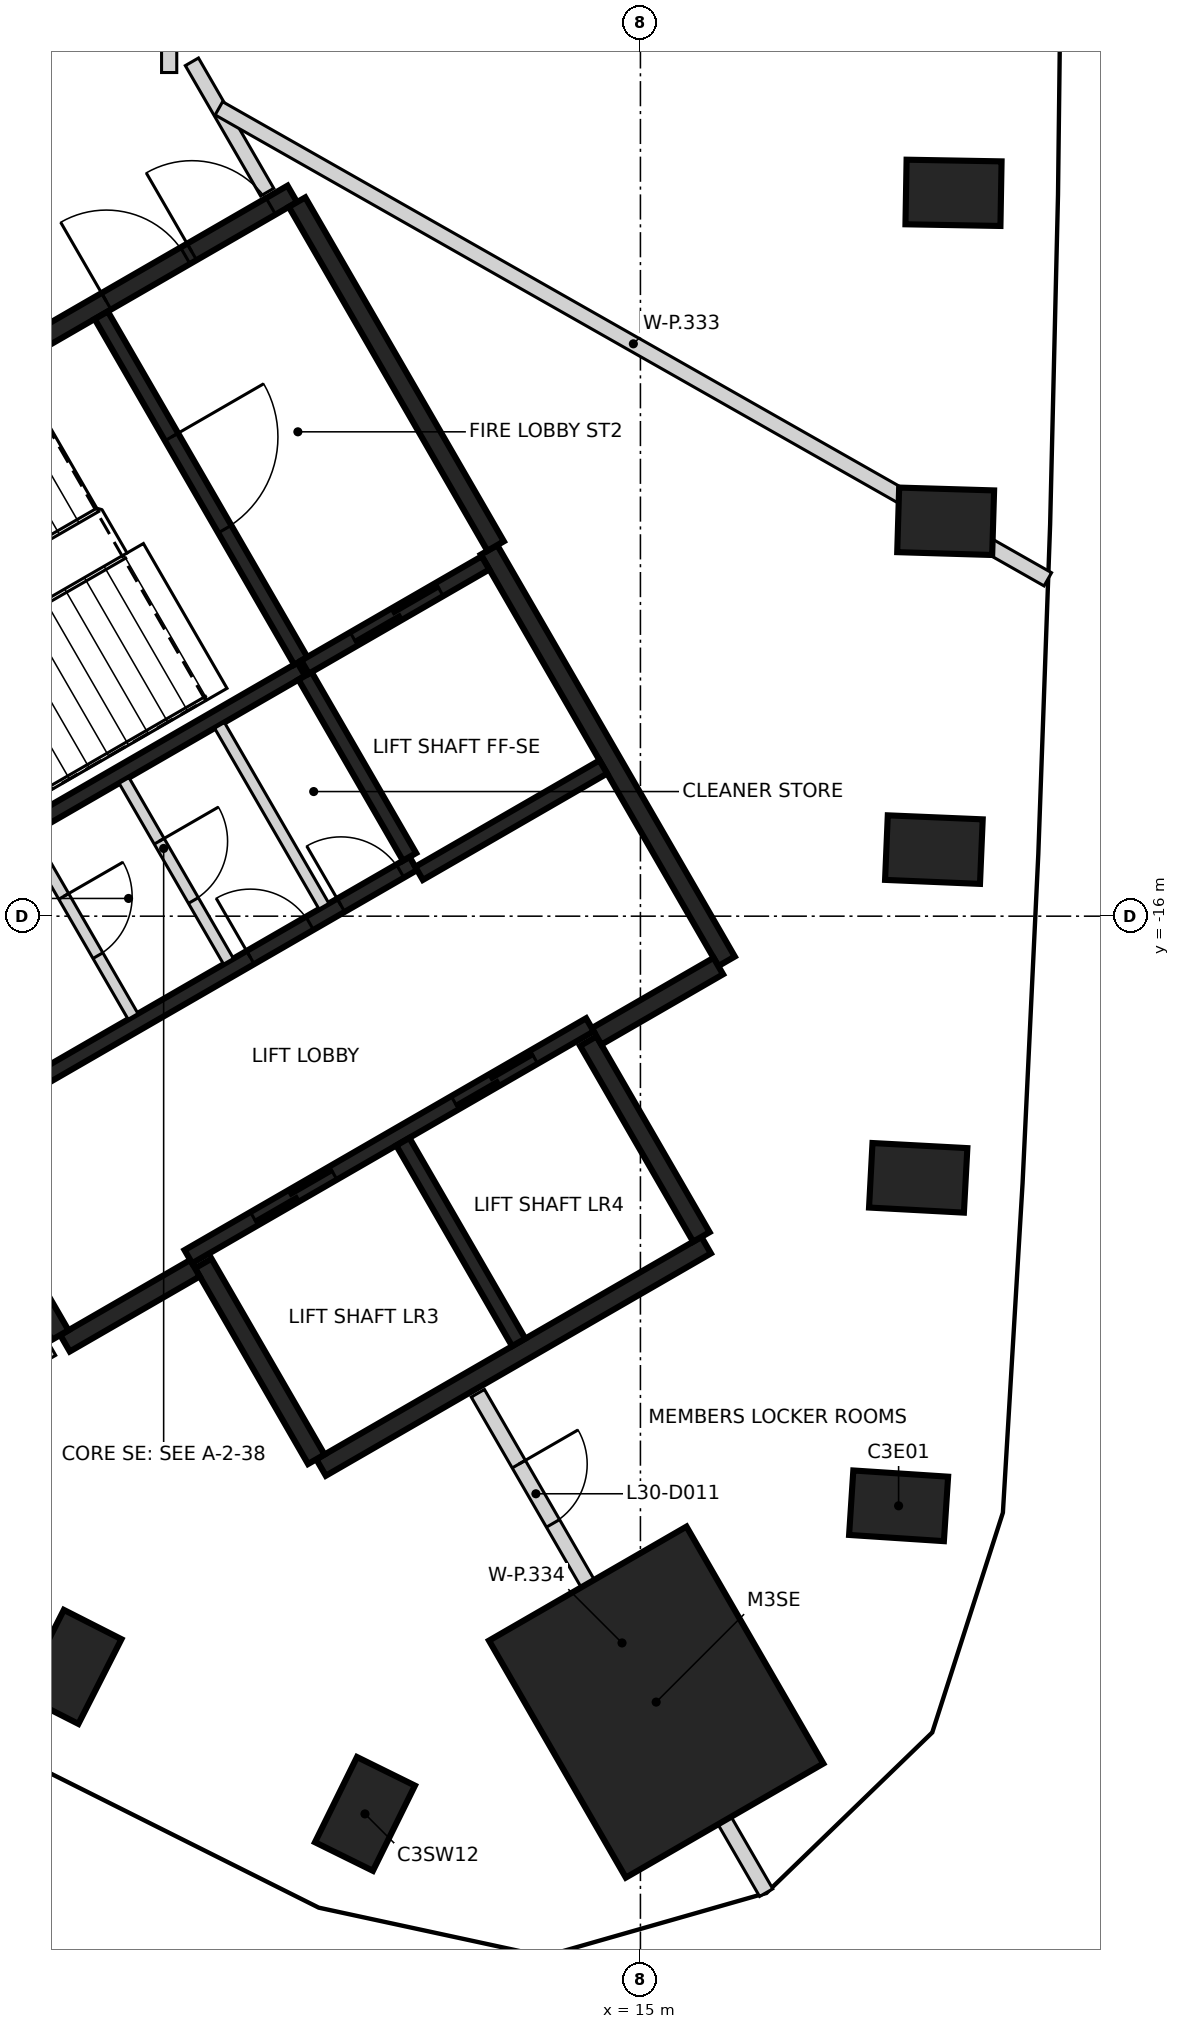
"""IFC4 building model, lengths in metres.
Left out: names, types, materials, properties, quantities, classifications, styles, units other than length and angle.
Written with IfcOpenShell. Run it as: python <this file> out.ifc"""

import sys

from ifc_helpers import new_model, si_unit, direction, frame, frame_2d, origin, origin_2d, place, context, subcontext, project, spatial, rectangle, extrude, element, fill, save


model = new_model("IFC4")
c1 = context("Model", 3, precision=1e-05, world=origin(), true_north=direction((0.0, 1.0)))
c2 = subcontext(c1, "Body", "Model", "MODEL_VIEW")
j1 = project(units=[si_unit("LENGTHUNIT", "METRE"), si_unit("PLANEANGLEUNIT", "RADIAN")], contexts=[c1])
p1 = place(None, origin())
s1 = spatial("IfcSite", under=j1, at=p1, CompositionType="ELEMENT")
p2 = place(p1, origin())
s2 = spatial("IfcBuilding", under=s1, at=p2, CompositionType="ELEMENT")
p3 = place(p2, frame((0.0, 0.0, 123.8)))
s3 = spatial("IfcBuildingStorey", under=s2, at=p3, CompositionType="ELEMENT", Elevation=123.8)
for number, where, z_axis, x_axis in (
    (1, (18.397, -23.757, -0.4), (0.0, 0.0, 1.0), (-0.998, 0.065, 0.0)),
    (2, (18.655, -19.442, -0.4), (0.0, 0.0, 1.0), (-0.999, 0.054, 0.0)),
    (3, (18.861, -15.124, -0.4), (0.0, 0.0, 1.0), (-0.999, 0.042, 0.0)),
    (4, (19.016, -10.805, -0.4), (0.0, 0.0, 1.0), (-1.0, 0.03, 0.0)),
    (5, (19.119, -6.484, -0.4), (0.0, 0.0, 1.0), (-1.0, 0.018, 0.0)),
    (6, (7.51, -25.876, -0.4), (0.0, 0.0, 1.0), (0.453, 0.892, 0.0)),
    (7, (11.376, -27.811, -0.4), (0.0, 0.0, 1.0), (0.442, 0.897, 0.0)),
):
    element("IfcColumn", number, at=place(p3, frame(where, z_axis=z_axis, x_axis=x_axis)), inside=s3, PredefinedType="COLUMN", context=c2, shape_type="SweptSolid", body=[
        extrude(rectangle(XDim=1.25, YDim=0.85, at=origin_2d()), origin(), (0.0, 0.0, 1.0), 5.0),
    ])
p4 = place(p3, frame((15.207, -26.34, -0.4), z_axis=(0.0, 0.0, 1.0), x_axis=(-0.5, 0.866025403784, 0.0)))
e8 = element("IfcColumn", 8, at=p4, inside=s3, PredefinedType="COLUMN", context=c2, shape_type="SweptSolid", body=[
    extrude(rectangle(XDim=3.6, YDim=3.0, at=origin_2d()), origin(), (0.0, 0.0, 1.0), 5.0),
])
p5 = place(p3, frame((0.417, -12.273, 0.0), z_axis=(0.0, 0.0, 1.0), x_axis=(0.866021906294, 0.500006057782, 0.0)))
e9 = element("IfcWall", 9, at=p5, inside=s3, PredefinedType="SHEAR", context=c2, shape_type="SweptSolid", body=[
    extrude(rectangle(XDim=11.55, YDim=0.25, at=frame_2d((5.775, 0.0))), origin(), (0.0, 0.0, 1.0), 4.6),
])
p6 = place(p5, frame((10.025, 0.0, 0.0)))
e10 = element("IfcOpeningElement", 10, at=p6, cuts=e9, PredefinedType="OPENING", context=c2, shape_type="SweptSolid", body=[
    extrude(rectangle(XDim=1.2, YDim=2.1, at=frame_2d((0.6, 1.05))), frame((0.0, 0.135, 0.0), z_axis=(0.0, -1.0, 0.0), x_axis=(1.0, 0.0, 0.0)), (0.0, 0.0, 1.0), 0.27),
])
p7 = place(p5, frame((8.725, 0.0, 0.0)))
e11 = element("IfcOpeningElement", 11, at=p7, cuts=e9, PredefinedType="OPENING", context=c2, shape_type="SweptSolid", body=[
    extrude(rectangle(XDim=1.2, YDim=2.1, at=frame_2d((0.6, 1.05))), frame((0.0, 0.135, 0.0), z_axis=(0.0, -1.0, 0.0), x_axis=(1.0, 0.0, 0.0)), (0.0, 0.0, 1.0), 0.27),
])
p8 = place(p3, frame((13.008, -11.181, 0.0), z_axis=(0.0, 0.0, 1.0), x_axis=(0.500004234368, -0.866022959057, 0.0)))
e12 = element("IfcWall", 12, at=p8, inside=s3, PredefinedType="SHEAR", context=c2, shape_type="SweptSolid", body=[
    extrude(rectangle(XDim=6.25, YDim=0.25, at=frame_2d((3.125, 0.0))), origin(), (0.0, 0.0, 1.0), 4.6),
])
p9 = place(p3, frame((15.865, -20.328, 0.0), z_axis=(0.0, 0.0, 1.0), x_axis=(-0.86602852612, -0.499994591916, 0.0)))
e13 = element("IfcWall", 13, at=p9, inside=s3, PredefinedType="SHEAR", context=c2, shape_type="SweptSolid", body=[
    extrude(rectangle(XDim=5.85, YDim=0.25, at=frame_2d((2.925, 0.0))), origin(), (0.0, 0.0, 1.0), 4.6),
])
p10 = place(p3, frame((10.483, -6.606, 0.0), z_axis=(0.0, 0.0, 1.0), x_axis=(0.49999885962, -0.866026062182, 0.0)))
e14 = element("IfcWall", 14, at=p10, inside=s3, PredefinedType="SHEAR", context=c2, shape_type="SweptSolid", body=[
    extrude(rectangle(XDim=5.225, YDim=0.25, at=frame_2d((2.612, 0.0))), origin(), (0.0, 0.0, 1.0), 4.6),
])
for number, where, z_axis, x_axis in (
    (15, (14.315, -17.644, 0.0), (0.0, 0.0, 1.0), (0.5, -0.866, 0.0)),
    (16, (10.736, -23.145, 0.0), (0.0, 0.0, 1.0), (-0.5, 0.866, 0.0)),
):
    element("IfcWall", number, at=place(p3, frame(where, z_axis=z_axis, x_axis=x_axis)), inside=s3, PredefinedType="SHEAR", context=c2, shape_type="SweptSolid", body=[
        extrude(rectangle(XDim=2.974, YDim=0.25, at=frame_2d((1.487, 0.0))), origin(), (0.0, 0.0, 1.0), 4.6),
    ])
p11 = place(p3, frame((9.14, -20.631, 0.0), z_axis=(0.0, 0.0, 1.0), x_axis=(-0.866043531843, -0.499968599967, 0.0)))
e17 = element("IfcWall", 17, at=p11, inside=s3, PredefinedType="SHEAR", context=c2, shape_type="SweptSolid", body=[
    extrude(rectangle(XDim=1.975, YDim=0.25, at=frame_2d((0.987, 0.0))), origin(), (0.0, 0.0, 1.0), 4.6),
])
p12 = place(p3, frame((16.025, -16.656, 0.0), z_axis=(0.0, 0.0, 1.0), x_axis=(-0.866016279763, -0.500015802937, 0.0)))
e18 = element("IfcWall", 18, at=p12, inside=s3, PredefinedType="SHEAR", context=c2, shape_type="SweptSolid", body=[
    extrude(rectangle(XDim=1.849, YDim=0.25, at=frame_2d((0.925, 0.0))), origin(), (0.0, 0.0, 1.0), 4.6),
])
p13 = place(p3, frame((7.367, -21.51, 0.0), z_axis=(0.0, 0.0, 1.0), x_axis=(-0.499983108224, 0.866035156036, 0.0)))
e19 = element("IfcWall", 19, at=p13, inside=s3, PredefinedType="SHEAR", context=c2, shape_type="SweptSolid", body=[
    extrude(rectangle(XDim=1.865, YDim=0.25, at=frame_2d((0.932, 0.0))), origin(), (0.0, 0.0, 1.0), 4.6),
])
p14 = place(p13, frame((0.535, 0.0, 0.0)))
e20 = element("IfcOpeningElement", 20, at=p14, cuts=e19, PredefinedType="OPENING", context=c2, shape_type="SweptSolid", body=[
    extrude(rectangle(XDim=1.25, YDim=2.1, at=frame_2d((0.625, 1.05))), frame((0.0, 0.135, 0.0), z_axis=(0.0, -1.0, 0.0), x_axis=(1.0, 0.0, 0.0)), (0.0, 0.0, 1.0), 0.27),
])
p15 = place(p3, frame((9.052, -20.48, 0.0), z_axis=(0.0, 0.0, 1.0), x_axis=(0.866030299012, 0.499991521122, 0.0)))
e21 = element("IfcWall", 21, at=p15, inside=s3, PredefinedType="SHEAR", context=c2, shape_type="SweptSolid", body=[
    extrude(rectangle(XDim=6.1, YDim=0.2, at=frame_2d((3.05, 0.0))), origin(), (0.0, 0.0, 1.0), 4.6),
])
p16 = place(p15, frame((1.0, 0.0, 0.0)))
e22 = element("IfcOpeningElement", 22, at=p16, cuts=e21, PredefinedType="OPENING", context=c2, shape_type="SweptSolid", body=[
    extrude(rectangle(XDim=1.2, YDim=2.1, at=frame_2d((0.6, 1.05))), frame((0.0, 0.11, 0.0), z_axis=(0.0, -1.0, 0.0), x_axis=(1.0, 0.0, 0.0)), (0.0, 0.0, 1.0), 0.22),
])
p17 = place(p15, frame((4.05, 0.0, 0.0)))
e23 = element("IfcOpeningElement", 23, at=p17, cuts=e21, PredefinedType="OPENING", context=c2, shape_type="SweptSolid", body=[
    extrude(rectangle(XDim=1.2, YDim=2.1, at=frame_2d((0.6, 1.05))), frame((0.0, 0.11, 0.0), z_axis=(0.0, -1.0, 0.0), x_axis=(1.0, 0.0, 0.0)), (0.0, 0.0, 1.0), 0.22),
])
p18 = place(p3, frame((10.538, -12.752, 0.0), z_axis=(0.0, 0.0, 1.0), x_axis=(-0.866038630372, -0.499977090179, 0.0)))
e24 = element("IfcWall", 24, at=p18, inside=s3, PredefinedType="SHEAR", context=c2, shape_type="SweptSolid", body=[
    extrude(rectangle(XDim=5.699, YDim=0.2, at=frame_2d((2.85, 0.0))), origin(), (0.0, 0.0, 1.0), 4.6),
])
p19 = place(p3, frame((7.077, -18.156, 0.0), z_axis=(0.0, 0.0, 1.0), x_axis=(0.866038630372, 0.499977090179, 0.0)))
e25 = element("IfcWall", 25, at=p19, inside=s3, PredefinedType="SHEAR", context=c2, shape_type="SweptSolid", body=[
    extrude(rectangle(XDim=5.699, YDim=0.2, at=frame_2d((2.85, 0.0))), origin(), (0.0, 0.0, 1.0), 4.6),
])
p20 = place(p19, frame((3.224, 0.0, 0.0)))
e26 = element("IfcOpeningElement", 26, at=p20, cuts=e25, PredefinedType="OPENING", context=c2, shape_type="SweptSolid", body=[
    extrude(rectangle(XDim=0.9, YDim=2.1, at=frame_2d((0.45, 1.05))), frame((0.0, 0.11, 0.0), z_axis=(0.0, -1.0, 0.0), x_axis=(1.0, 0.0, 0.0)), (0.0, 0.0, 1.0), 0.22),
])
p21 = place(p19, frame((4.599, 0.0, 0.0)))
e27 = element("IfcOpeningElement", 27, at=p21, cuts=e25, PredefinedType="OPENING", context=c2, shape_type="SweptSolid", body=[
    extrude(rectangle(XDim=0.9, YDim=2.1, at=frame_2d((0.45, 1.05))), frame((0.0, 0.11, 0.0), z_axis=(0.0, -1.0, 0.0), x_axis=(1.0, 0.0, 0.0)), (0.0, 0.0, 1.0), 0.22),
])
p22 = place(p3, frame((7.906, -8.094, 0.0), z_axis=(0.0, 0.0, 1.0), x_axis=(0.500024287448, -0.866011380966, 0.0)))
e28 = element("IfcWall", 28, at=p22, inside=s3, PredefinedType="SHEAR", context=c2, shape_type="SweptSolid", body=[
    extrude(rectangle(XDim=5.251, YDim=0.2, at=frame_2d((2.625, 0.0))), origin(), (0.0, 0.0, 1.0), 4.6),
])
p23 = place(p22, frame((1.849, 0.0, 0.0)))
e29 = element("IfcOpeningElement", 29, at=p23, cuts=e28, PredefinedType="OPENING", context=c2, shape_type="SweptSolid", body=[
    extrude(rectangle(XDim=1.4, YDim=2.1, at=frame_2d((0.7, 1.05))), frame((0.0, 0.11, 0.0), z_axis=(0.0, -1.0, 0.0), x_axis=(1.0, 0.0, 0.0)), (0.0, 0.0, 1.0), 0.22),
])
p24 = place(p3, frame((11.875, -18.967, 0.0), z_axis=(0.0, 0.0, 1.0), x_axis=(0.49998131003, -0.866036194175, 0.0)))
e30 = element("IfcWall", 30, at=p24, inside=s3, PredefinedType="SHEAR", context=c2, shape_type="SweptSolid", body=[
    extrude(rectangle(XDim=3.048, YDim=0.2, at=frame_2d((1.524, 0.0))), origin(), (0.0, 0.0, 1.0), 4.6),
])
p25 = place(p3, frame((11.963, -15.22, 0.0), z_axis=(0.0, 0.0, 1.0), x_axis=(-0.500034990121, 0.866005201286, 0.0)))
e31 = element("IfcWall", 31, at=p25, inside=s3, PredefinedType="SHEAR", context=c2, shape_type="SweptSolid", body=[
    extrude(rectangle(XDim=2.75, YDim=0.2, at=frame_2d((1.375, 0.0))), origin(), (0.0, 0.0, 1.0), 4.6),
])
p26 = place(p3, frame((10.587, -12.723, 0.0), z_axis=(0.0, 0.0, 1.0), x_axis=(0.866037306777, 0.499979382845, 0.0)))
e32 = element("IfcWall", 32, at=p26, inside=s3, PredefinedType="SHEAR", context=c2, shape_type="SweptSolid", body=[
    extrude(rectangle(XDim=2.742, YDim=0.2, at=frame_2d((1.371, 0.0))), origin(), (0.0, 0.0, 1.0), 4.6),
])
p27 = place(p26, frame((0.743, 0.0, 0.0)))
e33 = element("IfcOpeningElement", 33, at=p27, cuts=e32, PredefinedType="OPENING", context=c2, shape_type="SweptSolid", body=[
    extrude(rectangle(XDim=1.3, YDim=2.1, at=frame_2d((0.65, 1.05))), frame((0.0, 0.11, 0.0), z_axis=(0.0, -1.0, 0.0), x_axis=(1.0, 0.0, 0.0)), (0.0, 0.0, 1.0), 0.22),
])
p28 = place(p3, frame((14.512, -14.037, 0.0), z_axis=(0.0, 0.0, 1.0), x_axis=(-0.866044696403, -0.499966582715, 0.0)))
e34 = element("IfcWall", 34, at=p28, inside=s3, PredefinedType="SHEAR", context=c2, shape_type="SweptSolid", body=[
    extrude(rectangle(XDim=2.799, YDim=0.2, at=frame_2d((1.399, 0.0))), origin(), (0.0, 0.0, 1.0), 4.6),
])
p29 = place(p3, frame((8.207, -14.214, 0.0), z_axis=(0.0, 0.0, 1.0), x_axis=(0.50002746344, -0.86600954718, 0.0)))
e35 = element("IfcWall", 35, at=p29, inside=s3, PredefinedType="PARTITIONING", context=c2, shape_type="SweptSolid", body=[
    extrude(rectangle(XDim=2.748, YDim=0.15, at=frame_2d((1.374, 0.0))), origin(), (0.0, 0.0, 1.0), 4.6),
])
p30 = place(p29, frame((0.924, 0.0, 0.0)))
e36 = element("IfcOpeningElement", 36, at=p30, cuts=e35, PredefinedType="OPENING", context=c2, shape_type="SweptSolid", body=[
    extrude(rectangle(XDim=0.9, YDim=2.1, at=frame_2d((0.45, 1.05))), frame((0.0, 0.085, 0.0), z_axis=(0.0, -1.0, 0.0), x_axis=(1.0, 0.0, 0.0)), (0.0, 0.0, 1.0), 0.17),
])
p31 = place(p3, frame((9.462, -13.489, 0.0), z_axis=(0.0, 0.0, 1.0), x_axis=(0.499988999718, -0.866031754707, 0.0)))
e37 = element("IfcWall", 37, at=p31, inside=s3, PredefinedType="PARTITIONING", context=c2, shape_type="SweptSolid", body=[
    extrude(rectangle(XDim=2.749, YDim=0.15, at=frame_2d((1.374, 0.0))), origin(), (0.0, 0.0, 1.0), 4.6),
])
p32 = place(p3, frame((6.951, -14.939, 0.0), z_axis=(0.0, 0.0, 1.0), x_axis=(0.499988999718, -0.866031754707, 0.0)))
e38 = element("IfcWall", 38, at=p32, inside=s3, PredefinedType="PARTITIONING", context=c2, shape_type="SweptSolid", body=[
    extrude(rectangle(XDim=2.749, YDim=0.15, at=frame_2d((1.374, 0.0))), origin(), (0.0, 0.0, 1.0), 4.6),
])
p33 = place(p32, frame((0.924, 0.0, 0.0)))
e39 = element("IfcOpeningElement", 39, at=p33, cuts=e38, PredefinedType="OPENING", context=c2, shape_type="SweptSolid", body=[
    extrude(rectangle(XDim=0.9, YDim=2.1, at=frame_2d((0.45, 1.05))), frame((0.0, 0.085, 0.0), z_axis=(0.0, -1.0, 0.0), x_axis=(1.0, 0.0, 0.0)), (0.0, 0.0, 1.0), 0.17),
])
p34 = place(p3, frame((6.056, -22.384, 0.0), z_axis=(0.0, 0.0, 1.0), x_axis=(0.866276386163, 0.499565033581, 0.0)))
e40 = element("IfcWall", 40, at=p34, inside=s3, PredefinedType="PARTITIONING", context=c2, shape_type="SweptSolid", body=[
    extrude(rectangle(XDim=1.387, YDim=0.2, at=frame_2d((0.694, 0.0))), origin(), (0.0, 0.0, 1.0), 4.6),
])
p35 = place(p3, frame((8.8, -4.901, 0.0), z_axis=(0.0, 0.0, 1.0), x_axis=(0.0, 1.0, 0.0)))
e41 = element("IfcWall", 41, at=p35, inside=s3, PredefinedType="PARTITIONING", context=c2, shape_type="SweptSolid", body=[
    extrude(rectangle(XDim=8.685, YDim=0.2, at=frame_2d((4.342, 0.0))), origin(), (0.0, 0.0, 1.0), 4.6),
])
p36 = place(p35, frame((1.956, 0.0, 0.0)))
e42 = element("IfcOpeningElement", 42, at=p36, cuts=e41, PredefinedType="OPENING", context=c2, shape_type="SweptSolid", body=[
    extrude(rectangle(XDim=1.0, YDim=2.1, at=frame_2d((0.5, 1.05))), frame((0.0, 0.11, 0.0), z_axis=(0.0, -1.0, 0.0), x_axis=(1.0, 0.0, 0.0)), (0.0, 0.0, 1.0), 0.22),
])
p37 = place(p3, frame((9.099, -4.76, 0.0), z_axis=(0.0, 0.0, 1.0), x_axis=(0.500195451667, -0.865912530301, 0.0)))
e43 = element("IfcWall", 43, at=p37, inside=s3, PredefinedType="PARTITIONING", context=c2, shape_type="SweptSolid", body=[
    extrude(rectangle(XDim=1.981, YDim=0.2, at=frame_2d((0.99, 0.0))), origin(), (0.0, 0.0, 1.0), 4.6),
])
p38 = place(p3, frame((9.454, -5.372, 0.0), z_axis=(0.0, 0.0, 1.0), x_axis=(0.869462257487, -0.493999375308, 0.0)))
e44 = element("IfcWall", 44, at=p38, inside=s3, PredefinedType="PARTITIONING", context=c2, shape_type="SweptSolid", body=[
    extrude(rectangle(XDim=12.543, YDim=0.2, at=frame_2d((6.271, 0.0))), origin(), (0.0, 0.0, 1.0), 4.6),
])
p39 = place(p3, frame((12.861, -22.276, 0.0), z_axis=(0.0, 0.0, 1.0), x_axis=(0.500032570359, -0.866006598462, 0.0)))
e45 = element("IfcWall", 45, at=p39, inside=s3, PredefinedType="PARTITIONING", context=c2, shape_type="SweptSolid", body=[
    extrude(rectangle(XDim=7.587, YDim=0.2, at=frame_2d((3.793, 0.0))), origin(), (0.0, 0.0, 1.0), 4.6),
])
p40 = place(p39, frame((1.077, 0.0, 0.0)))
e46 = element("IfcOpeningElement", 46, at=p40, cuts=e45, PredefinedType="OPENING", context=c2, shape_type="SweptSolid", body=[
    extrude(rectangle(XDim=0.9, YDim=2.1, at=frame_2d((0.45, 1.05))), frame((0.0, 0.11, 0.0), z_axis=(0.0, -1.0, 0.0), x_axis=(1.0, 0.0, 0.0)), (0.0, 0.0, 1.0), 0.22),
])
p41 = place(p27, origin())
e47 = element("IfcDoor", 47, at=p41, inside=s3, OperationType="SLIDING_TO_LEFT", PredefinedType="DOOR", context=c2, shape_type="SweptSolid", body=[
    extrude(rectangle(XDim=1.3, YDim=2.1, at=frame_2d((0.65, 1.05))), frame((0.0, 0.025, 0.0), z_axis=(0.0, -1.0, 0.0), x_axis=(1.0, 0.0, 0.0)), (0.0, 0.0, 1.0), 0.05),
])
fill(e33, e47)
p42 = place(p16, origin())
e48 = element("IfcDoor", 48, at=p42, inside=s3, OperationType="DOUBLE_DOOR_SLIDING", PredefinedType="DOOR", context=c2, shape_type="SweptSolid", body=[
    extrude(rectangle(XDim=1.2, YDim=2.1, at=frame_2d((0.6, 1.05))), frame((0.0, 0.025, 0.0), z_axis=(0.0, -1.0, 0.0), x_axis=(1.0, 0.0, 0.0)), (0.0, 0.0, 1.0), 0.05),
])
fill(e22, e48)
p43 = place(p17, origin())
e49 = element("IfcDoor", 49, at=p43, inside=s3, OperationType="DOUBLE_DOOR_SLIDING", PredefinedType="DOOR", context=c2, shape_type="SweptSolid", body=[
    extrude(rectangle(XDim=1.2, YDim=2.1, at=frame_2d((0.6, 1.05))), frame((0.0, 0.025, 0.0), z_axis=(0.0, -1.0, 0.0), x_axis=(1.0, 0.0, 0.0)), (0.0, 0.0, 1.0), 0.05),
])
fill(e23, e49)
p44 = place(p6, origin())
e50 = element("IfcDoor", 50, at=p44, inside=s3, OperationType="SINGLE_SWING_LEFT", PredefinedType="DOOR", context=c2, shape_type="SweptSolid", body=[
    extrude(rectangle(XDim=1.2, YDim=2.1, at=frame_2d((0.6, 1.05))), frame((0.0, 0.025, 0.0), z_axis=(0.0, -1.0, 0.0), x_axis=(1.0, 0.0, 0.0)), (0.0, 0.0, 1.0), 0.05),
])
fill(e10, e50)
p45 = place(p7, origin())
e51 = element("IfcDoor", 51, at=p45, inside=s3, OperationType="SINGLE_SWING_RIGHT", PredefinedType="DOOR", context=c2, shape_type="SweptSolid", body=[
    extrude(rectangle(XDim=1.2, YDim=2.1, at=frame_2d((0.6, 1.05))), frame((0.0, 0.025, 0.0), z_axis=(0.0, -1.0, 0.0), x_axis=(1.0, 0.0, 0.0)), (0.0, 0.0, 1.0), 0.05),
])
fill(e11, e51)
p46 = place(p23, origin())
e52 = element("IfcDoor", 52, at=p46, inside=s3, OperationType="SINGLE_SWING_LEFT", PredefinedType="DOOR", context=c2, shape_type="SweptSolid", body=[
    extrude(rectangle(XDim=1.4, YDim=2.1, at=frame_2d((0.7, 1.05))), frame((0.0, 0.025, 0.0), z_axis=(0.0, -1.0, 0.0), x_axis=(1.0, 0.0, 0.0)), (0.0, 0.0, 1.0), 0.05),
])
fill(e29, e52)
p47 = place(p20, origin())
e53 = element("IfcDoor", 53, at=p47, inside=s3, OperationType="SINGLE_SWING_RIGHT", PredefinedType="DOOR", context=c2, shape_type="SweptSolid", body=[
    extrude(rectangle(XDim=0.9, YDim=2.1, at=frame_2d((0.45, 1.05))), frame((0.0, 0.025, 0.0), z_axis=(0.0, -1.0, 0.0), x_axis=(1.0, 0.0, 0.0)), (0.0, 0.0, 1.0), 0.05),
])
fill(e26, e53)
p48 = place(p21, origin())
e54 = element("IfcDoor", 54, at=p48, inside=s3, OperationType="SINGLE_SWING_LEFT", PredefinedType="DOOR", context=c2, shape_type="SweptSolid", body=[
    extrude(rectangle(XDim=0.9, YDim=2.1, at=frame_2d((0.45, 1.05))), frame((0.0, 0.025, 0.0), z_axis=(0.0, -1.0, 0.0), x_axis=(1.0, 0.0, 0.0)), (0.0, 0.0, 1.0), 0.05),
])
fill(e27, e54)
p49 = place(p30, origin())
e55 = element("IfcDoor", 55, at=p49, inside=s3, OperationType="SINGLE_SWING_LEFT", PredefinedType="DOOR", context=c2, shape_type="SweptSolid", body=[
    extrude(rectangle(XDim=0.9, YDim=2.1, at=frame_2d((0.45, 1.05))), frame((0.0, 0.025, 0.0), z_axis=(0.0, -1.0, 0.0), x_axis=(1.0, 0.0, 0.0)), (0.0, 0.0, 1.0), 0.05),
])
fill(e36, e55)
p50 = place(p33, origin())
e56 = element("IfcDoor", 56, at=p50, inside=s3, OperationType="SINGLE_SWING_RIGHT", PredefinedType="DOOR", context=c2, shape_type="SweptSolid", body=[
    extrude(rectangle(XDim=0.9, YDim=2.1, at=frame_2d((0.45, 1.05))), frame((0.0, 0.025, 0.0), z_axis=(0.0, -1.0, 0.0), x_axis=(1.0, 0.0, 0.0)), (0.0, 0.0, 1.0), 0.05),
])
fill(e39, e56)
p51 = place(p40, origin())
e57 = element("IfcDoor", 57, at=p51, inside=s3, OperationType="SINGLE_SWING_LEFT", PredefinedType="DOOR", context=c2, shape_type="SweptSolid", body=[
    extrude(rectangle(XDim=0.9, YDim=2.1, at=frame_2d((0.45, 1.05))), frame((0.0, 0.025, 0.0), z_axis=(0.0, -1.0, 0.0), x_axis=(1.0, 0.0, 0.0)), (0.0, 0.0, 1.0), 0.05),
])
fill(e46, e57)
save(model, sys.argv[1])
